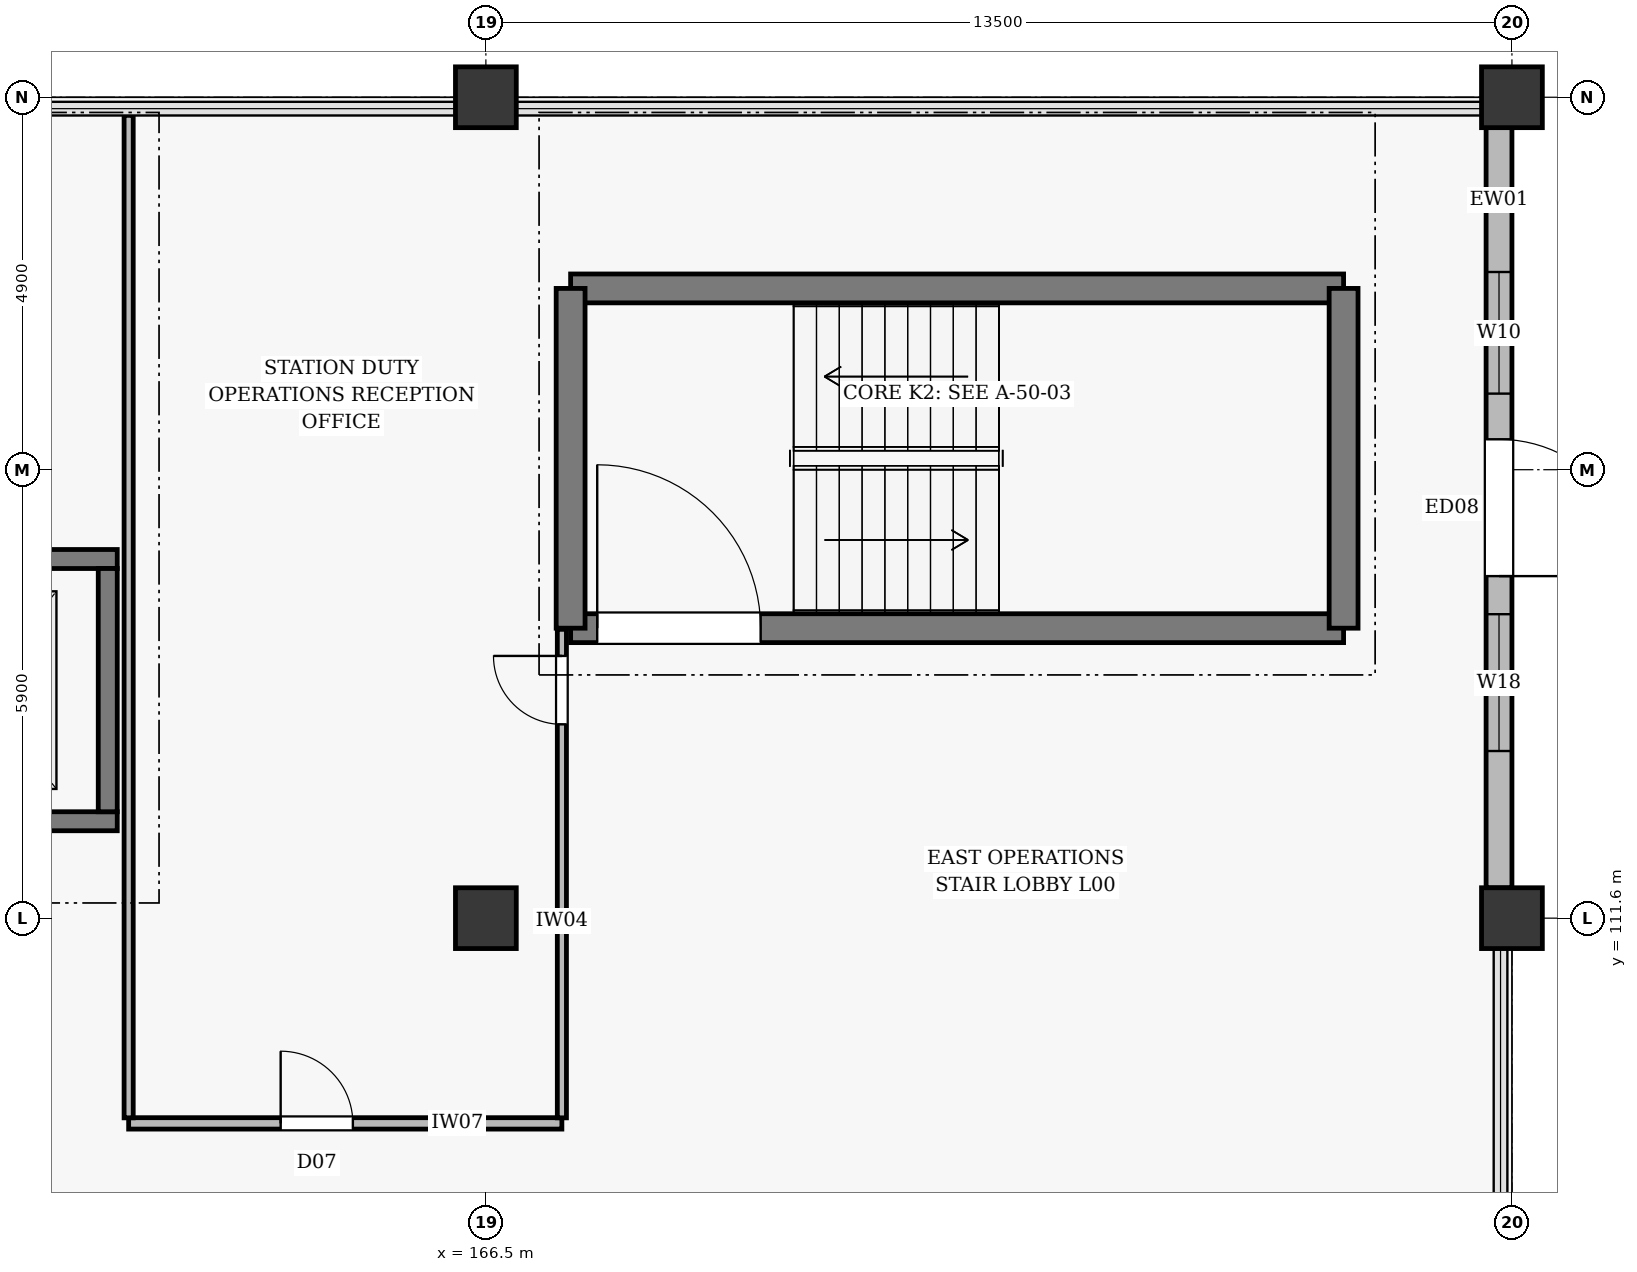
"""IFC4 building model, lengths in metres.
Left out: names, types, materials, properties, quantities, classifications, styles, units other than length and angle.
Written with IfcOpenShell. Run it as: python <this file> out.ifc"""

import sys

from ifc_helpers import new_model, si_unit, direction, frame, frame_2d, origin, origin_2d, place, context, subcontext, project, spatial, rectangle, extrude, element, fill, save


model = new_model("IFC4")
c1 = context("Model", 3, precision=1e-05, world=origin(), true_north=direction((0.0, 1.0)))
c2 = subcontext(c1, "Body", "Model", "MODEL_VIEW")
j1 = project(units=[si_unit("LENGTHUNIT", "METRE"), si_unit("PLANEANGLEUNIT", "RADIAN")], contexts=[c1])
p1 = place(None, origin())
s1 = spatial("IfcSite", under=j1, at=p1, CompositionType="ELEMENT")
p2 = place(p1, origin())
s2 = spatial("IfcBuilding", under=s1, at=p2, CompositionType="ELEMENT")
p3 = place(p2, origin())
s3 = spatial("IfcBuildingStorey", under=s2, at=p3, CompositionType="ELEMENT", Elevation=0.0)
for number, where, z_axis, x_axis in (
    (1, (166.5, 111.6, 0.0), (0.0, 0.0, 1.0), (1.0, 0.0, 0.0)),
    (2, (166.5, 122.4, 0.0), (0.0, 0.0, 1.0), (1.0, 0.0, 0.0)),
    (3, (180.0, 111.6, 0.0), (0.0, 0.0, 1.0), (1.0, 0.0, 0.0)),
    (4, (180.0, 122.4, 0.0), (0.0, 0.0, 1.0), (1.0, 0.0, 0.0)),
):
    element("IfcColumn", number, at=place(p3, frame(where, z_axis=z_axis, x_axis=x_axis)), inside=s3, PredefinedType="COLUMN", context=c2, shape_type="SweptSolid", body=[
        extrude(rectangle(XDim=0.8, YDim=0.8, at=origin_2d()), origin(), (0.0, 0.0, 1.0), 6.6),
    ])
p4 = place(p3, frame((179.83, 122.002, 0.0), z_axis=(0.0, 0.0, 1.0), x_axis=(0.0, -1.0, 0.0)))
e5 = element("IfcWall", 5, at=p4, inside=s3, PredefinedType="STANDARD", context=c2, shape_type="SweptSolid", body=[
    extrude(rectangle(XDim=10.004, YDim=0.34, at=frame_2d((5.002, 0.0))), origin(), (0.0, 0.0, 1.0), 5.75),
])
p5 = place(p4, frame((4.102, 0.0, 0.005)))
e6 = element("IfcOpeningElement", 6, at=p5, cuts=e5, PredefinedType="OPENING", context=c2, shape_type="SweptSolid", body=[
    extrude(rectangle(XDim=1.8, YDim=2.35, at=frame_2d((0.9, 1.175))), frame((0.0, 0.182, 0.0), z_axis=(0.0, -1.0, 0.0), x_axis=(1.0, 0.0, 0.0)), (0.0, 0.0, 1.0), 0.364),
])
p6 = place(p4, frame((1.901, 0.0, 0.75)))
e7 = element("IfcOpeningElement", 7, at=p6, cuts=e5, PredefinedType="OPENING", context=c2, shape_type="SweptSolid", body=[
    extrude(rectangle(XDim=1.6, YDim=2.1, at=frame_2d((0.8, 1.05))), frame((0.0, 0.182, 0.0), z_axis=(0.0, -1.0, 0.0), x_axis=(1.0, 0.0, 0.0)), (0.0, 0.0, 1.0), 0.364),
])
p7 = place(p4, frame((6.403, 0.0, 1.05)))
e8 = element("IfcOpeningElement", 8, at=p7, cuts=e5, PredefinedType="OPENING", context=c2, shape_type="SweptSolid", body=[
    extrude(rectangle(XDim=1.8, YDim=1.1, at=frame_2d((0.9, 0.55))), frame((0.0, 0.182, 0.0), z_axis=(0.0, -1.0, 0.0), x_axis=(1.0, 0.0, 0.0)), (0.0, 0.0, 1.0), 0.364),
])
p8 = place(p3, frame((167.615, 115.415, 0.0), z_axis=(0.0, 0.0, 1.0), x_axis=(1.0, 0.0, 0.0)))
e9 = element("IfcWall", 9, at=p8, inside=s3, PredefinedType="SOLIDWALL", context=c2, shape_type="SweptSolid", body=[
    extrude(rectangle(XDim=10.17, YDim=0.38, at=frame_2d((5.085, 0.0))), origin(), (0.0, 0.0, 1.0), 6.6),
])
p9 = place(p8, frame((0.35, 0.0, 0.005)))
e10 = element("IfcOpeningElement", 10, at=p9, cuts=e9, PredefinedType="OPENING", context=c2, shape_type="SweptSolid", body=[
    extrude(rectangle(XDim=2.15, YDim=2.2, at=frame_2d((1.075, 1.1))), frame((0.0, 0.202, 0.0), z_axis=(0.0, -1.0, 0.0), x_axis=(1.0, 0.0, 0.0)), (0.0, 0.0, 1.0), 0.404),
])
p10 = place(p3, frame((167.615, 119.885, 0.0), z_axis=(0.0, 0.0, 1.0), x_axis=(1.0, 0.0, 0.0)))
e11 = element("IfcWall", 11, at=p10, inside=s3, PredefinedType="SOLIDWALL", context=c2, shape_type="SweptSolid", body=[
    extrude(rectangle(XDim=10.17, YDim=0.38, at=frame_2d((5.085, 0.0))), origin(), (0.0, 0.0, 1.0), 6.6),
])
for number, where, z_axis, x_axis in (
    (12, (167.615, 115.415, 0.0), (0.0, 0.0, 1.0), (0.0, 1.0, 0.0)),
    (13, (177.785, 115.415, 0.0), (0.0, 0.0, 1.0), (0.0, 1.0, 0.0)),
):
    element("IfcWall", number, at=place(p3, frame(where, z_axis=z_axis, x_axis=x_axis)), inside=s3, PredefinedType="SOLIDWALL", context=c2, shape_type="SweptSolid", body=[
        extrude(rectangle(XDim=4.47, YDim=0.38, at=frame_2d((2.235, 0.0))), origin(), (0.0, 0.0, 1.0), 6.6),
    ])
p11 = place(p3, frame((157.95, 112.875, 0.0), z_axis=(0.0, 0.0, 1.0), x_axis=(1.0, 0.0, 0.0)))
e14 = element("IfcWall", 14, at=p11, inside=s3, PredefinedType="SOLIDWALL", context=c2, shape_type="SweptSolid", body=[
    extrude(rectangle(XDim=3.7, YDim=0.25, at=frame_2d((1.85, 0.0))), origin(), (0.0, 0.0, 1.0), 6.6),
])
p12 = place(p11, frame((1.225, 0.0, 0.005)))
e15 = element("IfcOpeningElement", 15, at=p12, cuts=e14, PredefinedType="OPENING", context=c2, shape_type="SweptSolid", body=[
    extrude(rectangle(XDim=1.25, YDim=2.2, at=frame_2d((0.625, 1.1))), frame((0.0, 0.137, 0.0), z_axis=(0.0, -1.0, 0.0), x_axis=(1.0, 0.0, 0.0)), (0.0, 0.0, 1.0), 0.274),
])
p13 = place(p3, frame((157.95, 116.325, 0.0), z_axis=(0.0, 0.0, 1.0), x_axis=(1.0, 0.0, 0.0)))
e16 = element("IfcWall", 16, at=p13, inside=s3, PredefinedType="SOLIDWALL", context=c2, shape_type="SweptSolid", body=[
    extrude(rectangle(XDim=3.7, YDim=0.25, at=frame_2d((1.85, 0.0))), origin(), (0.0, 0.0, 1.0), 6.6),
])
p14 = place(p3, frame((161.525, 113.0, 0.0), z_axis=(0.0, 0.0, 1.0), x_axis=(0.0, 1.0, 0.0)))
e17 = element("IfcWall", 17, at=p14, inside=s3, PredefinedType="SOLIDWALL", context=c2, shape_type="SweptSolid", body=[
    extrude(rectangle(XDim=3.2, YDim=0.25, at=frame_2d((1.6, 0.0))), origin(), (0.0, 0.0, 1.0), 6.6),
])
p15 = place(p3, frame((161.8, 108.9, 0.0), z_axis=(0.0, 0.0, 1.0), x_axis=(1.0, 0.0, 0.0)))
e18 = element("IfcWall", 18, at=p15, inside=s3, PredefinedType="PARTITIONING", context=c2, shape_type="SweptSolid", body=[
    extrude(rectangle(XDim=5.7, YDim=0.15, at=frame_2d((2.85, 0.0))), origin(), (0.0, 0.0, 1.0), 5.89),
])
p16 = place(p15, frame((2.0, 0.0, 0.005)))
e19 = element("IfcOpeningElement", 19, at=p16, cuts=e18, PredefinedType="OPENING", context=c2, shape_type="SweptSolid", body=[
    extrude(rectangle(XDim=0.95, YDim=2.1, at=frame_2d((0.475, 1.05))), frame((0.0, 0.087, 0.0), z_axis=(0.0, -1.0, 0.0), x_axis=(1.0, 0.0, 0.0)), (0.0, 0.0, 1.0), 0.174),
])
p17 = place(p3, frame((167.5, 108.973, 0.0), z_axis=(0.0, 0.0, 1.0), x_axis=(0.0, 1.0, 0.0)))
e20 = element("IfcWall", 20, at=p17, inside=s3, PredefinedType="PARTITIONING", context=c2, shape_type="SweptSolid", body=[
    extrude(rectangle(XDim=6.427, YDim=0.12, at=frame_2d((3.213, 0.0))), origin(), (0.0, 0.0, 1.0), 5.74),
])
p18 = place(p17, frame((5.177, 0.0, 0.005)))
e21 = element("IfcOpeningElement", 21, at=p18, cuts=e20, PredefinedType="OPENING", context=c2, shape_type="SweptSolid", body=[
    extrude(rectangle(XDim=0.9, YDim=2.1, at=frame_2d((0.45, 1.05))), frame((0.0, 0.072, 0.0), z_axis=(0.0, -1.0, 0.0), x_axis=(1.0, 0.0, 0.0)), (0.0, 0.0, 1.0), 0.144),
])
p19 = place(p3, frame((161.8, 108.973, 0.0), z_axis=(0.0, 0.0, 1.0), x_axis=(0.0, 1.0, 0.0)))
e22 = element("IfcWall", 22, at=p19, inside=s3, PredefinedType="PARTITIONING", context=c2, shape_type="SweptSolid", body=[
    extrude(rectangle(XDim=13.189, YDim=0.12, at=frame_2d((6.595, 0.0))), origin(), (0.0, 0.0, 1.0), 5.74),
])
p20 = place(p5, origin())
e23 = element("IfcDoor", 23, at=p20, inside=s3, OperationType="SINGLE_SWING_RIGHT", PredefinedType="DOOR", context=c2, shape_type="SweptSolid", body=[
    extrude(rectangle(XDim=1.8, YDim=2.35, at=frame_2d((0.9, 1.175))), frame((0.0, 0.025, 0.0), z_axis=(0.0, -1.0, 0.0), x_axis=(1.0, 0.0, 0.0)), (0.0, 0.0, 1.0), 0.05),
])
fill(e6, e23)
p21 = place(p6, origin())
e24 = element("IfcWindow", 24, at=p21, inside=s3, PartitioningType="DOUBLE_PANEL_VERTICAL", PredefinedType="WINDOW", context=c2, shape_type="SweptSolid", body=[
    extrude(rectangle(XDim=1.6, YDim=2.1, at=frame_2d((0.8, 1.05))), frame((0.0, 0.03, 0.0), z_axis=(0.0, -1.0, 0.0), x_axis=(1.0, 0.0, 0.0)), (0.0, 0.0, 1.0), 0.06),
])
fill(e7, e24)
p22 = place(p7, origin())
e25 = element("IfcWindow", 25, at=p22, inside=s3, PartitioningType="DOUBLE_PANEL_VERTICAL", PredefinedType="WINDOW", context=c2, shape_type="SweptSolid", body=[
    extrude(rectangle(XDim=1.8, YDim=1.1, at=frame_2d((0.9, 0.55))), frame((0.0, 0.03, 0.0), z_axis=(0.0, -1.0, 0.0), x_axis=(1.0, 0.0, 0.0)), (0.0, 0.0, 1.0), 0.06),
])
fill(e8, e25)
p23 = place(p9, origin())
e26 = element("IfcDoor", 26, at=p23, inside=s3, OperationType="SINGLE_SWING_LEFT", PredefinedType="DOOR", context=c2, shape_type="SweptSolid", body=[
    extrude(rectangle(XDim=2.15, YDim=2.2, at=frame_2d((1.075, 1.1))), frame((0.0, 0.025, 0.0), z_axis=(0.0, -1.0, 0.0), x_axis=(1.0, 0.0, 0.0)), (0.0, 0.0, 1.0), 0.05),
])
fill(e10, e26)
p24 = place(p16, origin())
e27 = element("IfcDoor", 27, at=p24, inside=s3, OperationType="SINGLE_SWING_LEFT", PredefinedType="DOOR", context=c2, shape_type="SweptSolid", body=[
    extrude(rectangle(XDim=0.95, YDim=2.1, at=frame_2d((0.475, 1.05))), frame((0.0, 0.025, 0.0), z_axis=(0.0, -1.0, 0.0), x_axis=(1.0, 0.0, 0.0)), (0.0, 0.0, 1.0), 0.05),
])
fill(e19, e27)
p25 = place(p18, origin())
e28 = element("IfcDoor", 28, at=p25, inside=s3, OperationType="SINGLE_SWING_RIGHT", PredefinedType="DOOR", context=c2, shape_type="SweptSolid", body=[
    extrude(rectangle(XDim=0.9, YDim=2.1, at=frame_2d((0.45, 1.05))), frame((0.0, 0.025, 0.0), z_axis=(0.0, -1.0, 0.0), x_axis=(1.0, 0.0, 0.0)), (0.0, 0.0, 1.0), 0.05),
])
fill(e21, e28)
save(model, sys.argv[1])
